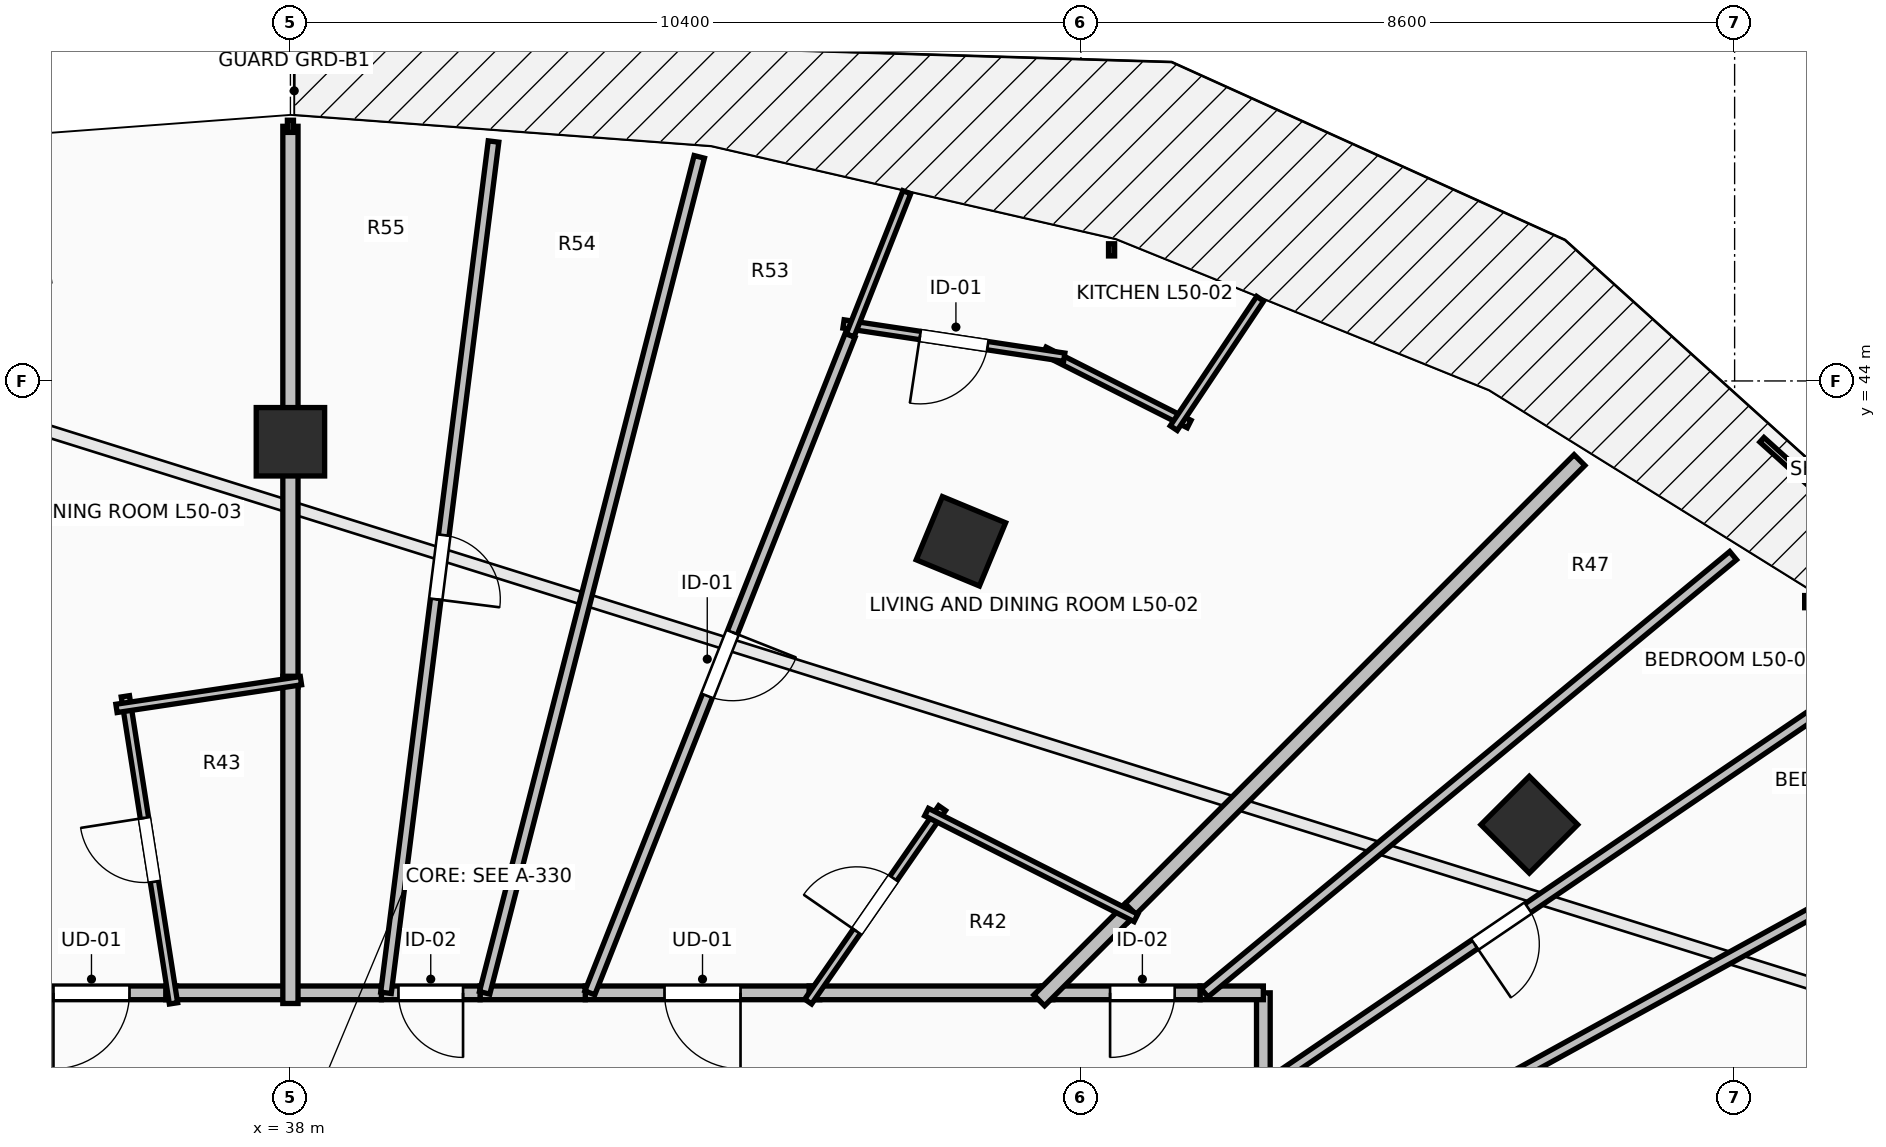
"""IFC4 building model, lengths in metres.
Left out: names, types, materials, properties, quantities, classifications, styles, units other than length and angle.
Written with IfcOpenShell. Run it as: python <this file> out.ifc"""

import sys

from ifc_helpers import new_model, si_unit, direction, frame, frame_2d, origin, origin_2d, place, context, subcontext, project, spatial, rectangle, extrude, element, fill, save


model = new_model("IFC4")
c1 = context("Model", 3, precision=1e-05, world=origin(), true_north=direction((0.0, 1.0)))
c2 = subcontext(c1, "Body", "Model", "MODEL_VIEW")
j1 = project(units=[si_unit("LENGTHUNIT", "METRE"), si_unit("PLANEANGLEUNIT", "RADIAN")], contexts=[c1])
p1 = place(None, origin())
s1 = spatial("IfcSite", under=j1, at=p1, CompositionType="ELEMENT")
p2 = place(p1, origin())
s2 = spatial("IfcBuilding", under=s1, at=p2, CompositionType="ELEMENT")
p3 = place(p2, frame((0.0, 0.0, 186.1)))
s3 = spatial("IfcBuildingStorey", under=s2, at=p3, CompositionType="ELEMENT", Elevation=186.1)
for number, where, z_axis, x_axis in (
    (1, (54.299, 38.162, 0.0), (0.0, 0.0, 1.0), (0.707, 0.707, 0.0)),
    (2, (46.821, 41.891, 0.0), (0.0, 0.0, 1.0), (0.383, 0.924, 0.0)),
    (3, (38.0, 43.2, 0.0), (0.0, 0.0, 1.0), (0.0, 1.0, 0.0)),
):
    element("IfcColumn", number, at=place(p3, frame(where, z_axis=z_axis, x_axis=x_axis)), inside=s3, PredefinedType="COLUMN", context=c2, shape_type="SweptSolid", body=[
        extrude(rectangle(XDim=0.9, YDim=0.9, at=origin_2d()), origin(), (0.0, 0.0, 1.0), 3.5),
    ])
p4 = place(p3, frame((50.8, 34.772, 0.0), z_axis=(0.0, 0.0, 1.0), x_axis=(0.0, 1.0, 0.0)))
e4 = element("IfcWall", 4, at=p4, inside=s3, PredefinedType="PARTITIONING", context=c2, shape_type="SweptSolid", body=[
    extrude(rectangle(XDim=1.178, YDim=0.18, at=frame_2d((0.589, 0.0))), origin(), (0.0, 0.0, 1.0), 2.432),
])
p5 = place(p3, frame((50.8, 35.95, 0.0), z_axis=(0.0, 0.0, 1.0), x_axis=(-1.0, 0.0, 0.0)))
e5 = element("IfcWall", 5, at=p5, inside=s3, PredefinedType="PARTITIONING", context=c2, shape_type="SweptSolid", body=[
    extrude(rectangle(XDim=0.833, YDim=0.18, at=frame_2d((0.417, 0.0))), origin(), (0.0, 0.0, 1.0), 3.24),
])
p6 = place(p3, frame((49.967, 35.95, 0.0), z_axis=(0.0, 0.0, 1.0), x_axis=(-1.0, 0.0, 0.0)))
e6 = element("IfcWall", 6, at=p6, inside=s3, PredefinedType="PARTITIONING", context=c2, shape_type="SweptSolid", body=[
    extrude(rectangle(XDim=2.077, YDim=0.18, at=frame_2d((1.039, 0.0))), origin(), (0.0, 0.0, 1.0), 2.432),
])
p7 = place(p6, frame((0.333, 0.0, 0.0)))
e7 = element("IfcOpeningElement", 7, at=p7, cuts=e6, PredefinedType="OPENING", context=c2, shape_type="SweptSolid", body=[
    extrude(rectangle(XDim=0.85, YDim=2.1, at=frame_2d((0.425, 1.05))), frame((0.0, 0.105, 0.0), z_axis=(0.0, -1.0, 0.0), x_axis=(1.0, 0.0, 0.0)), (0.0, 0.0, 1.0), 0.21),
])
p8 = place(p3, frame((44.964, 35.95, 0.0), z_axis=(0.0, 0.0, 1.0), x_axis=(-1.0, 0.0, 0.0)))
e8 = element("IfcWall", 8, at=p8, inside=s3, PredefinedType="PARTITIONING", context=c2, shape_type="SweptSolid", body=[
    extrude(rectangle(XDim=3.085, YDim=0.18, at=frame_2d((1.542, 0.0))), origin(), (0.0, 0.0, 1.0), 2.922),
])
p9 = place(p8, frame((1.042, 0.0, 0.0)))
e9 = element("IfcOpeningElement", 9, at=p9, cuts=e8, PredefinedType="OPENING", context=c2, shape_type="SweptSolid", body=[
    extrude(rectangle(XDim=1.0, YDim=2.15, at=frame_2d((0.5, 1.075))), frame((0.0, 0.105, 0.0), z_axis=(0.0, -1.0, 0.0), x_axis=(1.0, 0.0, 0.0)), (0.0, 0.0, 1.0), 0.21),
])
p10 = place(p3, frame((48.03, 35.95, 0.0), z_axis=(0.0, 0.0, 1.0), x_axis=(-1.0, 0.0, 0.0)))
e10 = element("IfcWall", 10, at=p10, inside=s3, PredefinedType="PARTITIONING", context=c2, shape_type="SweptSolid", body=[
    extrude(rectangle(XDim=3.206, YDim=0.18, at=frame_2d((1.603, 0.0))), origin(), (0.0, 0.0, 1.0), 2.432),
])
p11 = place(p3, frame((41.879, 35.95, 0.0), z_axis=(0.0, 0.0, 1.0), x_axis=(-1.0, 0.0, 0.0)))
e11 = element("IfcWall", 11, at=p11, inside=s3, PredefinedType="PARTITIONING", context=c2, shape_type="SweptSolid", body=[
    extrude(rectangle(XDim=1.384, YDim=0.18, at=frame_2d((0.692, 0.0))), origin(), (0.0, 0.0, 1.0), 2.922),
])
p12 = place(p3, frame((40.495, 35.95, 0.0), z_axis=(0.0, 0.0, 1.0), x_axis=(-1.0, 0.0, 0.0)))
e12 = element("IfcWall", 12, at=p12, inside=s3, PredefinedType="PARTITIONING", context=c2, shape_type="SweptSolid", body=[
    extrude(rectangle(XDim=1.298, YDim=0.18, at=frame_2d((0.649, 0.0))), origin(), (0.0, 0.0, 1.0), 2.922),
])
p13 = place(p12, frame((0.224, 0.0, 0.0)))
e13 = element("IfcOpeningElement", 13, at=p13, cuts=e12, PredefinedType="OPENING", context=c2, shape_type="SweptSolid", body=[
    extrude(rectangle(XDim=0.85, YDim=2.1, at=frame_2d((0.425, 1.05))), frame((0.0, 0.105, 0.0), z_axis=(0.0, -1.0, 0.0), x_axis=(1.0, 0.0, 0.0)), (0.0, 0.0, 1.0), 0.21),
])
p14 = place(p3, frame((39.197, 35.95, 0.0), z_axis=(0.0, 0.0, 1.0), x_axis=(-1.0, 0.0, 0.0)))
e14 = element("IfcWall", 14, at=p14, inside=s3, PredefinedType="PARTITIONING", context=c2, shape_type="SweptSolid", body=[
    extrude(rectangle(XDim=1.257, YDim=0.18, at=frame_2d((0.628, 0.0))), origin(), (0.0, 0.0, 1.0), 2.922),
])
p15 = place(p3, frame((36.5, 35.95, 0.0), z_axis=(0.0, 0.0, 1.0), x_axis=(-1.0, 0.0, 0.0)))
e15 = element("IfcWall", 15, at=p15, inside=s3, PredefinedType="PARTITIONING", context=c2, shape_type="SweptSolid", body=[
    extrude(rectangle(XDim=2.235, YDim=0.18, at=frame_2d((1.118, 0.0))), origin(), (0.0, 0.0, 1.0), 2.922),
])
p16 = place(p15, frame((0.617, 0.0, 0.0)))
e16 = element("IfcOpeningElement", 16, at=p16, cuts=e15, PredefinedType="OPENING", context=c2, shape_type="SweptSolid", body=[
    extrude(rectangle(XDim=1.0, YDim=2.15, at=frame_2d((0.5, 1.075))), frame((0.0, 0.105, 0.0), z_axis=(0.0, -1.0, 0.0), x_axis=(1.0, 0.0, 0.0)), (0.0, 0.0, 1.0), 0.21),
])
p17 = place(p3, frame((38.08, 35.95, 0.0), z_axis=(0.0, 0.0, 1.0), x_axis=(-1.0, 0.0, 0.0)))
e17 = element("IfcWall", 17, at=p17, inside=s3, PredefinedType="PARTITIONING", context=c2, shape_type="SweptSolid", body=[
    extrude(rectangle(XDim=1.72, YDim=0.18, at=frame_2d((0.86, 0.0))), origin(), (0.0, 0.0, 1.0), 2.922),
])
p18 = place(p3, frame((60.761, 38.513, 0.0), z_axis=(0.0, 0.0, 1.0), x_axis=(-0.876315654865, -0.481737348602, 0.0)))
e18 = element("IfcWall", 18, at=p18, inside=s3, PredefinedType="PARTITIONING", context=c2, shape_type="SweptSolid", body=[
    extrude(rectangle(XDim=11.367, YDim=0.14, at=frame_2d((5.684, 0.0))), origin(), (0.0, 0.0, 1.0), 2.432),
])
p19 = place(p3, frame((58.917, 40.215, 0.0), z_axis=(0.0, 0.0, 1.0), x_axis=(-0.827087951184, -0.562072522906, 0.0)))
e19 = element("IfcWall", 19, at=p19, inside=s3, PredefinedType="PARTITIONING", context=c2, shape_type="SweptSolid", body=[
    extrude(rectangle(XDim=9.814, YDim=0.14, at=frame_2d((4.907, 0.0))), origin(), (0.0, 0.0, 1.0), 2.432),
])
p20 = place(p19, frame((5.602, 0.0, 0.0)))
e20 = element("IfcOpeningElement", 20, at=p20, cuts=e19, PredefinedType="OPENING", context=c2, shape_type="SweptSolid", body=[
    extrude(rectangle(XDim=0.85, YDim=2.1, at=frame_2d((0.425, 1.05))), frame((0.0, 0.085, 0.0), z_axis=(0.0, -1.0, 0.0), x_axis=(1.0, 0.0, 0.0)), (0.0, 0.0, 1.0), 0.17),
])
p21 = place(p3, frame((56.98, 41.702, 0.0), z_axis=(0.0, 0.0, 1.0), x_axis=(-0.770511618294, -0.637425953405, 0.0)))
e21 = element("IfcWall", 21, at=p21, inside=s3, PredefinedType="PARTITIONING", context=c2, shape_type="SweptSolid", body=[
    extrude(rectangle(XDim=9.024, YDim=0.14, at=frame_2d((4.512, 0.0))), origin(), (0.0, 0.0, 1.0), 2.774),
])
p22 = place(p3, frame((54.959, 42.959, 0.0), z_axis=(0.0, 0.0, 1.0), x_axis=(-0.707106781187, -0.707106781187, 0.0)))
e22 = element("IfcWall", 22, at=p22, inside=s3, PredefinedType="PARTITIONING", context=c2, shape_type="SweptSolid", body=[
    extrude(rectangle(XDim=8.492, YDim=0.2, at=frame_2d((4.246, 0.0))), origin(), (0.0, 0.0, 1.0), 2.774),
])
p23 = place(p3, frame((49.053, 37.053, 0.0), z_axis=(0.0, 0.0, 1.0), x_axis=(-0.707106781187, -0.707106781187, 0.0)))
e23 = element("IfcWall", 23, at=p23, inside=s3, PredefinedType="PARTITIONING", context=c2, shape_type="SweptSolid", body=[
    extrude(rectangle(XDim=1.7, YDim=0.2, at=frame_2d((0.85, 0.0))), origin(), (0.0, 0.0, 1.0), 2.432),
])
p24 = place(p3, frame((44.811, 35.835, 0.0), z_axis=(0.0, 0.0, 1.0), x_axis=(0.569300192805, 0.822129728493, 0.0)))
e24 = element("IfcWall", 24, at=p24, inside=s3, PredefinedType="PARTITIONING", context=c2, shape_type="SweptSolid", body=[
    extrude(rectangle(XDim=3.096, YDim=0.11, at=frame_2d((1.548, 0.0))), origin(), (0.0, 0.0, 1.0), 2.922),
])
p25 = place(p24, frame((1.123, 0.0, 0.0)))
e25 = element("IfcOpeningElement", 25, at=p25, cuts=e24, PredefinedType="OPENING", context=c2, shape_type="SweptSolid", body=[
    extrude(rectangle(XDim=0.85, YDim=2.1, at=frame_2d((0.425, 1.05))), frame((0.0, 0.07, 0.0), z_axis=(0.0, -1.0, 0.0), x_axis=(1.0, 0.0, 0.0)), (0.0, 0.0, 1.0), 0.14),
])
p26 = place(p3, frame((46.369, 38.328, 0.0), z_axis=(0.0, 0.0, 1.0), x_axis=(0.892472891666, -0.451101028199, 0.0)))
e26 = element("IfcWall", 26, at=p26, inside=s3, PredefinedType="PARTITIONING", context=c2, shape_type="SweptSolid", body=[
    extrude(rectangle(XDim=3.086, YDim=0.11, at=frame_2d((1.543, 0.0))), origin(), (0.0, 0.0, 1.0), 2.432),
])
p27 = place(p3, frame((49.824, 43.433, 0.0), z_axis=(0.0, 0.0, 1.0), x_axis=(-0.892614331311, 0.450821090388, 0.0)))
e27 = element("IfcWall", 27, at=p27, inside=s3, PredefinedType="PARTITIONING", context=c2, shape_type="SweptSolid", body=[
    extrude(rectangle(XDim=2.136, YDim=0.11, at=frame_2d((1.068, 0.0))), origin(), (0.0, 0.0, 1.0), 3.24),
])
p28 = place(p3, frame((48.18, 44.312, 0.0), z_axis=(0.0, 0.0, 1.0), x_axis=(-0.988815285508, 0.149145335648, 0.0)))
e28 = element("IfcWall", 28, at=p28, inside=s3, PredefinedType="PARTITIONING", context=c2, shape_type="SweptSolid", body=[
    extrude(rectangle(XDim=2.937, YDim=0.11, at=frame_2d((1.468, 0.0))), origin(), (0.0, 0.0, 1.0), 3.24),
])
p29 = place(p28, frame((1.018, 0.0, 0.0)))
e29 = element("IfcOpeningElement", 29, at=p29, cuts=e28, PredefinedType="OPENING", context=c2, shape_type="SweptSolid", body=[
    extrude(rectangle(XDim=0.9, YDim=2.1, at=frame_2d((0.45, 1.05))), frame((0.0, 0.07, 0.0), z_axis=(0.0, -1.0, 0.0), x_axis=(1.0, 0.0, 0.0)), (0.0, 0.0, 1.0), 0.14),
])
p30 = place(p3, frame((45.364, 44.599, 0.0), z_axis=(0.0, 0.0, 1.0), x_axis=(0.368148258243, 0.929767099844, 0.0)))
e30 = element("IfcWall", 30, at=p30, inside=s3, PredefinedType="PARTITIONING", context=c2, shape_type="SweptSolid", body=[
    extrude(rectangle(XDim=2.027, YDim=0.11, at=frame_2d((1.013, 0.0))), origin(), (0.0, 0.0, 1.0), 3.24),
])
p31 = place(p3, frame((50.758, 45.081, 0.0), z_axis=(0.0, 0.0, 1.0), x_axis=(-0.55538833369, -0.831591124773, 0.0)))
e31 = element("IfcWall", 31, at=p31, inside=s3, PredefinedType="PARTITIONING", context=c2, shape_type="SweptSolid", body=[
    extrude(rectangle(XDim=2.046, YDim=0.11, at=frame_2d((1.023, 0.0))), origin(), (0.0, 0.0, 1.0), 3.24),
])
p32 = place(p3, frame((45.363, 44.599, 0.0), z_axis=(0.0, 0.0, 1.0), x_axis=(-0.368121248273, -0.929777794191, 0.0)))
e32 = element("IfcWall", 32, at=p32, inside=s3, PredefinedType="PARTITIONING", context=c2, shape_type="SweptSolid", body=[
    extrude(rectangle(XDim=9.302, YDim=0.14, at=frame_2d((4.651, 0.0))), origin(), (0.0, 0.0, 1.0), 2.774),
])
p33 = place(p32, frame((4.201, 0.0, 0.0)))
e33 = element("IfcOpeningElement", 33, at=p33, cuts=e32, PredefinedType="OPENING", context=c2, shape_type="SweptSolid", body=[
    extrude(rectangle(XDim=0.9, YDim=2.1, at=frame_2d((0.45, 1.05))), frame((0.0, 0.085, 0.0), z_axis=(0.0, -1.0, 0.0), x_axis=(1.0, 0.0, 0.0)), (0.0, 0.0, 1.0), 0.17),
])
p34 = place(p3, frame((43.379, 46.948, 0.0), z_axis=(0.0, 0.0, 1.0), x_axis=(-0.248702786244, -0.968579849116, 0.0)))
e34 = element("IfcWall", 34, at=p34, inside=s3, PredefinedType="PARTITIONING", context=c2, shape_type="SweptSolid", body=[
    extrude(rectangle(XDim=11.355, YDim=0.14, at=frame_2d((5.677, 0.0))), origin(), (0.0, 0.0, 1.0), 2.774),
])
p35 = place(p3, frame((40.672, 47.15, 0.0), z_axis=(0.0, 0.0, 1.0), x_axis=(-0.125346852027, -0.992112980808, 0.0)))
e35 = element("IfcWall", 35, at=p35, inside=s3, PredefinedType="PARTITIONING", context=c2, shape_type="SweptSolid", body=[
    extrude(rectangle(XDim=11.289, YDim=0.14, at=frame_2d((5.645, 0.0))), origin(), (0.0, 0.0, 1.0), 2.774),
])
p36 = place(p35, frame((5.219, 0.0, 0.0)))
e36 = element("IfcOpeningElement", 36, at=p36, cuts=e35, PredefinedType="OPENING", context=c2, shape_type="SweptSolid", body=[
    extrude(rectangle(XDim=0.85, YDim=2.1, at=frame_2d((0.425, 1.05))), frame((0.0, 0.085, 0.0), z_axis=(0.0, -1.0, 0.0), x_axis=(1.0, 0.0, 0.0)), (0.0, 0.0, 1.0), 0.17),
])
p37 = place(p3, frame((38.0, 47.35, 0.0), z_axis=(0.0, 0.0, 1.0), x_axis=(0.0, -1.0, 0.0)))
e37 = element("IfcWall", 37, at=p37, inside=s3, PredefinedType="PARTITIONING", context=c2, shape_type="SweptSolid", body=[
    extrude(rectangle(XDim=7.375, YDim=0.2, at=frame_2d((3.688, 0.0))), origin(), (0.0, 0.0, 1.0), 3.24),
])
p38 = place(p3, frame((38.0, 40.115, 0.0), z_axis=(0.0, 0.0, 1.0), x_axis=(0.0, -1.0, 0.0)))
e38 = element("IfcWall", 38, at=p38, inside=s3, PredefinedType="PARTITIONING", context=c2, shape_type="SweptSolid", body=[
    extrude(rectangle(XDim=4.305, YDim=0.2, at=frame_2d((2.152, 0.0))), origin(), (0.0, 0.0, 1.0), 2.874),
])
p39 = place(p3, frame((36.462, 35.812, 0.0), z_axis=(0.0, 0.0, 1.0), x_axis=(-0.154883213323, 0.987932786292, 0.0)))
e39 = element("IfcWall", 39, at=p39, inside=s3, PredefinedType="PARTITIONING", context=c2, shape_type="SweptSolid", body=[
    extrude(rectangle(XDim=4.089, YDim=0.11, at=frame_2d((2.044, 0.0))), origin(), (0.0, 0.0, 1.0), 2.874),
])
p40 = place(p39, frame((1.619, 0.0, 0.0)))
e40 = element("IfcOpeningElement", 40, at=p40, cuts=e39, PredefinedType="OPENING", context=c2, shape_type="SweptSolid", body=[
    extrude(rectangle(XDim=0.85, YDim=2.1, at=frame_2d((0.425, 1.05))), frame((0.0, 0.07, 0.0), z_axis=(0.0, -1.0, 0.0), x_axis=(1.0, 0.0, 0.0)), (0.0, 0.0, 1.0), 0.14),
])
p41 = place(p3, frame((35.712, 39.692, 0.0), z_axis=(0.0, 0.0, 1.0), x_axis=(0.988892526147, 0.148632337431, 0.0)))
e41 = element("IfcWall", 41, at=p41, inside=s3, PredefinedType="PARTITIONING", context=c2, shape_type="SweptSolid", body=[
    extrude(rectangle(XDim=2.454, YDim=0.11, at=frame_2d((1.227, 0.0))), origin(), (0.0, 0.0, 1.0), 3.24),
])
p42 = place(p9, origin())
e42 = element("IfcDoor", 42, at=p42, inside=s3, OperationType="SINGLE_SWING_LEFT", PredefinedType="DOOR", context=c2, shape_type="SweptSolid", body=[
    extrude(rectangle(XDim=1.0, YDim=2.15, at=frame_2d((0.5, 1.075))), frame((0.0, 0.025, 0.0), z_axis=(0.0, -1.0, 0.0), x_axis=(1.0, 0.0, 0.0)), (0.0, 0.0, 1.0), 0.05),
])
fill(e9, e42)
p43 = place(p16, origin())
e43 = element("IfcDoor", 43, at=p43, inside=s3, OperationType="SINGLE_SWING_RIGHT", PredefinedType="DOOR", context=c2, shape_type="SweptSolid", body=[
    extrude(rectangle(XDim=1.0, YDim=2.15, at=frame_2d((0.5, 1.075))), frame((0.0, 0.025, 0.0), z_axis=(0.0, -1.0, 0.0), x_axis=(1.0, 0.0, 0.0)), (0.0, 0.0, 1.0), 0.05),
])
fill(e16, e43)
p44 = place(p25, origin())
e44 = element("IfcDoor", 44, at=p44, inside=s3, OperationType="SINGLE_SWING_LEFT", PredefinedType="DOOR", context=c2, shape_type="SweptSolid", body=[
    extrude(rectangle(XDim=0.85, YDim=2.1, at=frame_2d((0.425, 1.05))), frame((0.0, 0.025, 0.0), z_axis=(0.0, -1.0, 0.0), x_axis=(1.0, 0.0, 0.0)), (0.0, 0.0, 1.0), 0.05),
])
fill(e25, e44)
p45 = place(p29, origin())
e45 = element("IfcDoor", 45, at=p45, inside=s3, OperationType="SINGLE_SWING_RIGHT", PredefinedType="DOOR", context=c2, shape_type="SweptSolid", body=[
    extrude(rectangle(XDim=0.9, YDim=2.1, at=frame_2d((0.45, 1.05))), frame((0.0, 0.025, 0.0), z_axis=(0.0, -1.0, 0.0), x_axis=(1.0, 0.0, 0.0)), (0.0, 0.0, 1.0), 0.05),
])
fill(e29, e45)
p46 = place(p33, origin())
e46 = element("IfcDoor", 46, at=p46, inside=s3, OperationType="SINGLE_SWING_LEFT", PredefinedType="DOOR", context=c2, shape_type="SweptSolid", body=[
    extrude(rectangle(XDim=0.9, YDim=2.1, at=frame_2d((0.45, 1.05))), frame((0.0, 0.025, 0.0), z_axis=(0.0, -1.0, 0.0), x_axis=(1.0, 0.0, 0.0)), (0.0, 0.0, 1.0), 0.05),
])
fill(e33, e46)
p47 = place(p40, origin())
e47 = element("IfcDoor", 47, at=p47, inside=s3, OperationType="SINGLE_SWING_RIGHT", PredefinedType="DOOR", context=c2, shape_type="SweptSolid", body=[
    extrude(rectangle(XDim=0.85, YDim=2.1, at=frame_2d((0.425, 1.05))), frame((0.0, 0.025, 0.0), z_axis=(0.0, -1.0, 0.0), x_axis=(1.0, 0.0, 0.0)), (0.0, 0.0, 1.0), 0.05),
])
fill(e40, e47)
p48 = place(p7, origin())
e48 = element("IfcDoor", 48, at=p48, inside=s3, OperationType="SINGLE_SWING_RIGHT", PredefinedType="DOOR", context=c2, shape_type="SweptSolid", body=[
    extrude(rectangle(XDim=0.85, YDim=2.1, at=frame_2d((0.425, 1.05))), frame((0.0, 0.025, 0.0), z_axis=(0.0, -1.0, 0.0), x_axis=(1.0, 0.0, 0.0)), (0.0, 0.0, 1.0), 0.05),
])
fill(e7, e48)
p49 = place(p13, origin())
e49 = element("IfcDoor", 49, at=p49, inside=s3, OperationType="SINGLE_SWING_LEFT", PredefinedType="DOOR", context=c2, shape_type="SweptSolid", body=[
    extrude(rectangle(XDim=0.85, YDim=2.1, at=frame_2d((0.425, 1.05))), frame((0.0, 0.025, 0.0), z_axis=(0.0, -1.0, 0.0), x_axis=(1.0, 0.0, 0.0)), (0.0, 0.0, 1.0), 0.05),
])
fill(e13, e49)
p50 = place(p20, origin())
e50 = element("IfcDoor", 50, at=p50, inside=s3, OperationType="SINGLE_SWING_RIGHT", PredefinedType="DOOR", context=c2, shape_type="SweptSolid", body=[
    extrude(rectangle(XDim=0.85, YDim=2.1, at=frame_2d((0.425, 1.05))), frame((0.0, 0.025, 0.0), z_axis=(0.0, -1.0, 0.0), x_axis=(1.0, 0.0, 0.0)), (0.0, 0.0, 1.0), 0.05),
])
fill(e20, e50)
p51 = place(p36, origin())
e51 = element("IfcDoor", 51, at=p51, inside=s3, OperationType="SINGLE_SWING_RIGHT", PredefinedType="DOOR", context=c2, shape_type="SweptSolid", body=[
    extrude(rectangle(XDim=0.85, YDim=2.1, at=frame_2d((0.425, 1.05))), frame((0.0, 0.025, 0.0), z_axis=(0.0, -1.0, 0.0), x_axis=(1.0, 0.0, 0.0)), (0.0, 0.0, 1.0), 0.05),
])
fill(e36, e51)
save(model, sys.argv[1])
